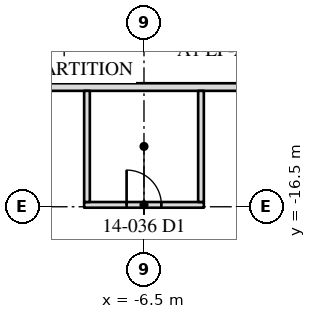
"""IFC4 building model, lengths in metres.
Left out: names, types, materials, properties, quantities, classifications, styles, units other than length and angle.
Written with IfcOpenShell. Run it as: python <this file> out.ifc"""

import sys

from ifc_helpers import new_model, si_unit, direction, frame, frame_2d, origin, place, context, subcontext, project, spatial, rectangle, extrude, element, fill, save


model = new_model("IFC4")
c1 = context("Model", 3, precision=1e-05, world=origin(), true_north=direction((0.0, 1.0)))
c2 = subcontext(c1, "Body", "Model", "MODEL_VIEW")
j1 = project(units=[si_unit("LENGTHUNIT", "METRE"), si_unit("PLANEANGLEUNIT", "RADIAN")], contexts=[c1])
p1 = place(None, origin())
s1 = spatial("IfcSite", under=j1, at=p1, CompositionType="ELEMENT")
p2 = place(p1, origin())
s2 = spatial("IfcBuilding", under=s1, at=p2, CompositionType="ELEMENT")
p3 = place(p2, frame((0.0, 0.0, 61.1)))
s3 = spatial("IfcBuildingStorey", under=s2, at=p3, CompositionType="ELEMENT", Elevation=61.1)
p4 = place(p3, frame((-13.45, -13.35, 0.0), z_axis=(0.0, 0.0, 1.0), x_axis=(1.0, 0.0, 0.0)))
e1 = element("IfcWall", 1, at=p4, inside=s3, PredefinedType="PARTITIONING", context=c2, shape_type="SweptSolid", body=[
    extrude(rectangle(XDim=26.7, YDim=0.2, at=frame_2d((13.35, 0.0))), origin(), (0.0, 0.0, 1.0), 3.91),
])
p5 = place(p3, frame((-8.075, -16.45, 0.0), z_axis=(0.0, 0.0, 1.0), x_axis=(1.0, 0.0, 0.0)))
e2 = element("IfcWall", 2, at=p5, inside=s3, PredefinedType="PARTITIONING", context=c2, shape_type="SweptSolid", body=[
    extrude(rectangle(XDim=3.15, YDim=0.15, at=frame_2d((1.575, 0.0))), origin(), (0.0, 0.0, 1.0), 3.91),
])
p6 = place(p5, frame((1.117, 0.0, 0.0)))
e3 = element("IfcOpeningElement", 3, at=p6, cuts=e2, PredefinedType="OPENING", context=c2, shape_type="SweptSolid", body=[
    extrude(rectangle(XDim=0.915, YDim=2.134, at=frame_2d((0.458, 1.067))), frame((0.0, 0.085, 0.0), z_axis=(0.0, -1.0, 0.0), x_axis=(1.0, 0.0, 0.0)), (0.0, 0.0, 1.0), 0.17),
])
for number, where, z_axis, x_axis in (
    (4, (-8.0, -16.375, 0.0), (0.0, 0.0, 1.0), (0.0, 1.0, 0.0)),
    (5, (-5.0, -16.375, 0.0), (0.0, 0.0, 1.0), (0.0, 1.0, 0.0)),
):
    element("IfcWall", number, at=place(p3, frame(where, z_axis=z_axis, x_axis=x_axis)), inside=s3, PredefinedType="PARTITIONING", context=c2, shape_type="SweptSolid", body=[
        extrude(rectangle(XDim=2.925, YDim=0.15, at=frame_2d((1.462, 0.0))), origin(), (0.0, 0.0, 1.0), 3.91),
    ])
p7 = place(p6, origin())
e6 = element("IfcDoor", 6, at=p7, inside=s3, OperationType="SINGLE_SWING_LEFT", PredefinedType="DOOR", context=c2, shape_type="SweptSolid", body=[
    extrude(rectangle(XDim=0.915, YDim=2.134, at=frame_2d((0.458, 1.067))), frame((0.0, 0.025, 0.0), z_axis=(0.0, -1.0, 0.0), x_axis=(1.0, 0.0, 0.0)), (0.0, 0.0, 1.0), 0.05),
])
fill(e3, e6)
save(model, sys.argv[1])
